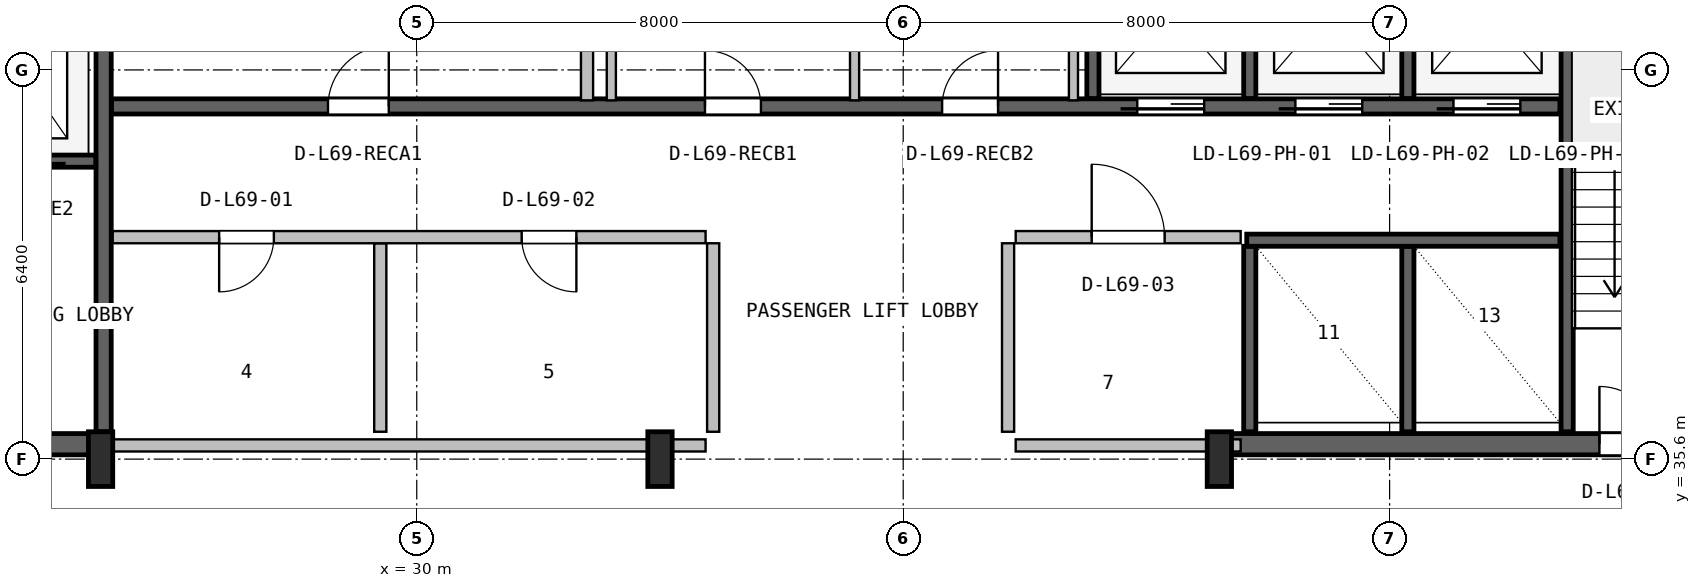
"""IFC4 building model, lengths in metres.
Left out: names, types, materials, properties, quantities, classifications, styles, units other than length and angle.
Written with IfcOpenShell. Run it as: python <this file> out.ifc"""

import sys

from ifc_helpers import new_model, si_unit, direction, frame, frame_2d, origin, origin_2d, place, context, subcontext, project, spatial, rectangle, i_section, extrude, source, transform, mapped, element, fill, save


model = new_model("IFC4")
c1 = context("Model", 3, precision=1e-05, world=origin(), true_north=direction((0.0, 1.0)))
c2 = subcontext(c1, "Body", "Model", "MODEL_VIEW")
j1 = project(units=[si_unit("LENGTHUNIT", "METRE"), si_unit("PLANEANGLEUNIT", "RADIAN")], contexts=[c1])
p1 = place(None, origin())
s1 = spatial("IfcSite", under=j1, at=p1, CompositionType="ELEMENT")
p2 = place(p1, origin())
s2 = spatial("IfcBuilding", under=s1, at=p2, CompositionType="ELEMENT")
p3 = place(p2, frame((0.0, 0.0, 277.4)))
s3 = spatial("IfcBuildingStorey", under=s2, at=p3, CompositionType="ELEMENT", Elevation=277.4)
p4 = place(p3, frame((15.67, 35.845, 0.0), z_axis=(0.0, 0.0, 1.0), x_axis=(1.0, 0.0, 0.0)))
e1 = element("IfcWall", 1, at=p4, inside=s3, PredefinedType="SHEAR", context=c2, shape_type="SweptSolid", body=[
    extrude(rectangle(XDim=9.13, YDim=0.35, at=frame_2d((4.565, 0.0))), origin(), (0.0, 0.0, 1.0), 3.55),
])
p5 = place(p4, frame((5.4, 0.0, 0.0)))
e2 = element("IfcOpeningElement", 2, at=p5, cuts=e1, PredefinedType="OPENING", context=c2, shape_type="SweptSolid", body=[
    extrude(rectangle(XDim=1.0, YDim=2.1, at=frame_2d((0.5, 1.05))), frame((0.0, 0.185, 0.0), z_axis=(0.0, -1.0, 0.0), x_axis=(1.0, 0.0, 0.0)), (0.0, 0.0, 1.0), 0.37),
])
p6 = place(p3, frame((43.2, 35.845, 0.0), z_axis=(0.0, 0.0, 1.0), x_axis=(1.0, 0.0, 0.0)))
e3 = element("IfcWall", 3, at=p6, inside=s3, PredefinedType="SHEAR", context=c2, shape_type="SweptSolid", body=[
    extrude(rectangle(XDim=9.13, YDim=0.35, at=frame_2d((4.565, 0.0))), origin(), (0.0, 0.0, 1.0), 3.55),
])
p7 = place(p6, frame((6.25, 0.0, 0.0)))
e4 = element("IfcOpeningElement", 4, at=p7, cuts=e3, PredefinedType="OPENING", context=c2, shape_type="SweptSolid", body=[
    extrude(rectangle(XDim=0.95, YDim=2.1, at=frame_2d((0.475, 1.05))), frame((0.0, 0.185, 0.0), z_axis=(0.0, -1.0, 0.0), x_axis=(1.0, 0.0, 0.0)), (0.0, 0.0, 1.0), 0.37),
])
m1 = source(origin(), c2, "Body", "SweptSolid", [
    extrude(i_section(OverallWidth=0.4, OverallDepth=0.9, WebThickness=0.016, FlangeThickness=0.028, FilletRadius=0.016, at=origin_2d()), origin(), (0.0, 0.0, 1.0), 3.8),
])
for number, where, z_axis, x_axis in (
    (5, (24.8, 35.6, 0.0), (0.0, 0.0, 1.0), (1.0, 0.0, 0.0)),
    (6, (34.0, 35.6, 0.0), (0.0, 0.0, 1.0), (1.0, 0.0, 0.0)),
    (7, (43.2, 35.6, 0.0), (0.0, 0.0, 1.0), (1.0, 0.0, 0.0)),
):
    element("IfcColumn", number, at=place(p3, frame(where, z_axis=z_axis, x_axis=x_axis)), inside=s3, PredefinedType="COLUMN", context=c2, shape_type="MappedRepresentation", body=[
        mapped(m1, transform((0.0, 0.0, 0.0), x_axis=(1.0, 0.0, 0.0), y_axis=(0.0, 1.0, 0.0), z_axis=(0.0, 0.0, 1.0), scale=1.0)),
    ])
p8 = place(p3, frame((24.85, 36.05, 0.0), z_axis=(0.0, 0.0, 1.0), x_axis=(0.0, 1.0, 0.0)))
e8 = element("IfcWall", 8, at=p8, inside=s3, PredefinedType="SHEAR", context=c2, shape_type="SweptSolid", body=[
    extrude(rectangle(XDim=10.45, YDim=0.25, at=frame_2d((5.225, 0.0))), origin(), (0.0, 0.0, 1.0), 3.55),
])
p9 = place(p3, frame((19.2, 40.5, 0.0), z_axis=(0.0, 0.0, 1.0), x_axis=(1.0, 0.0, 0.0)))
e9 = element("IfcWall", 9, at=p9, inside=s3, PredefinedType="SHEAR", context=c2, shape_type="SweptSolid", body=[
    extrude(rectangle(XDim=5.52, YDim=0.2, at=frame_2d((2.76, 0.0))), origin(), (0.0, 0.0, 1.0), 3.55),
])
p10 = place(p9, frame((1.05, 0.0, 0.0)))
e10 = element("IfcOpeningElement", 10, at=p10, cuts=e9, PredefinedType="OPENING", context=c2, shape_type="SweptSolid", body=[
    extrude(rectangle(XDim=1.1, YDim=2.18, at=frame_2d((0.55, 1.09))), frame((0.0, 0.11, 0.0), z_axis=(0.0, -1.0, 0.0), x_axis=(1.0, 0.0, 0.0)), (0.0, 0.0, 1.0), 0.22),
])
p11 = place(p9, frame((3.65, 0.0, 0.0)))
e11 = element("IfcOpeningElement", 11, at=p11, cuts=e9, PredefinedType="OPENING", context=c2, shape_type="SweptSolid", body=[
    extrude(rectangle(XDim=1.1, YDim=2.18, at=frame_2d((0.55, 1.09))), frame((0.0, 0.11, 0.0), z_axis=(0.0, -1.0, 0.0), x_axis=(1.0, 0.0, 0.0)), (0.0, 0.0, 1.0), 0.22),
])
p12 = place(p3, frame((48.92, 36.05, 0.0), z_axis=(0.0, 0.0, 1.0), x_axis=(0.0, 1.0, 0.0)))
e12 = element("IfcWall", 12, at=p12, inside=s3, PredefinedType="SHEAR", context=c2, shape_type="SweptSolid", body=[
    extrude(rectangle(XDim=10.5, YDim=0.2, at=frame_2d((5.25, 0.0))), origin(), (0.0, 0.0, 1.0), 3.55),
])
p13 = place(p3, frame((24.98, 41.4, 0.0), z_axis=(0.0, 0.0, 1.0), x_axis=(1.0, 0.0, 0.0)))
e13 = element("IfcWall", 13, at=p13, inside=s3, PredefinedType="SHEAR", context=c2, shape_type="SweptSolid", body=[
    extrude(rectangle(XDim=23.82, YDim=0.25, at=frame_2d((11.91, 0.0))), origin(), (0.0, 0.0, 1.0), 3.55),
])
p14 = place(p13, frame((16.87, 0.0, 0.0)))
e14 = element("IfcOpeningElement", 14, at=p14, cuts=e13, PredefinedType="OPENING", context=c2, shape_type="SweptSolid", body=[
    extrude(rectangle(XDim=1.1, YDim=2.18, at=frame_2d((0.55, 1.09))), frame((0.0, 0.135, 0.0), z_axis=(0.0, -1.0, 0.0), x_axis=(1.0, 0.0, 0.0)), (0.0, 0.0, 1.0), 0.27),
])
p15 = place(p13, frame((19.47, 0.0, 0.0)))
e15 = element("IfcOpeningElement", 15, at=p15, cuts=e13, PredefinedType="OPENING", context=c2, shape_type="SweptSolid", body=[
    extrude(rectangle(XDim=1.1, YDim=2.18, at=frame_2d((0.55, 1.09))), frame((0.0, 0.135, 0.0), z_axis=(0.0, -1.0, 0.0), x_axis=(1.0, 0.0, 0.0)), (0.0, 0.0, 1.0), 0.27),
])
p16 = place(p13, frame((22.07, 0.0, 0.0)))
e16 = element("IfcOpeningElement", 16, at=p16, cuts=e13, PredefinedType="OPENING", context=c2, shape_type="SweptSolid", body=[
    extrude(rectangle(XDim=1.1, YDim=2.18, at=frame_2d((0.55, 1.09))), frame((0.0, 0.135, 0.0), z_axis=(0.0, -1.0, 0.0), x_axis=(1.0, 0.0, 0.0)), (0.0, 0.0, 1.0), 0.27),
])
p17 = place(p13, frame((3.56, 0.0, 0.0)))
e17 = element("IfcOpeningElement", 17, at=p17, cuts=e13, PredefinedType="OPENING", context=c2, shape_type="SweptSolid", body=[
    extrude(rectangle(XDim=1.0, YDim=2.08, at=frame_2d((0.5, 1.04))), frame((0.0, 0.135, 0.0), z_axis=(0.0, -1.0, 0.0), x_axis=(1.0, 0.0, 0.0)), (0.0, 0.0, 1.0), 0.27),
])
p18 = place(p13, frame((9.76, 0.0, 0.0)))
e18 = element("IfcOpeningElement", 18, at=p18, cuts=e13, PredefinedType="OPENING", context=c2, shape_type="SweptSolid", body=[
    extrude(rectangle(XDim=0.92, YDim=2.08, at=frame_2d((0.46, 1.04))), frame((0.0, 0.135, 0.0), z_axis=(0.0, -1.0, 0.0), x_axis=(1.0, 0.0, 0.0)), (0.0, 0.0, 1.0), 0.27),
])
p19 = place(p13, frame((13.66, 0.0, 0.0)))
e19 = element("IfcOpeningElement", 19, at=p19, cuts=e13, PredefinedType="OPENING", context=c2, shape_type="SweptSolid", body=[
    extrude(rectangle(XDim=0.92, YDim=2.08, at=frame_2d((0.46, 1.04))), frame((0.0, 0.135, 0.0), z_axis=(0.0, -1.0, 0.0), x_axis=(1.0, 0.0, 0.0)), (0.0, 0.0, 1.0), 0.27),
])
p20 = place(p3, frame((41.12, 41.53, 0.0), z_axis=(0.0, 0.0, 1.0), x_axis=(0.0, 1.0, 0.0)))
e20 = element("IfcWall", 20, at=p20, inside=s3, PredefinedType="SHEAR", context=c2, shape_type="SweptSolid", body=[
    extrude(rectangle(XDim=5.02, YDim=0.2, at=frame_2d((2.51, 0.0))), origin(), (0.0, 0.0, 1.0), 3.55),
])
for number, where, z_axis, x_axis in (
    (21, (43.7, 41.53, 0.0), (0.0, 0.0, 1.0), (0.0, 1.0, 0.0)),
    (22, (46.3, 41.53, 0.0), (0.0, 0.0, 1.0), (0.0, 1.0, 0.0)),
):
    element("IfcWall", number, at=place(p3, frame(where, z_axis=z_axis, x_axis=x_axis)), inside=s3, PredefinedType="SHEAR", context=c2, shape_type="SweptSolid", body=[
        extrude(rectangle(XDim=2.87, YDim=0.2, at=frame_2d((1.435, 0.0))), origin(), (0.0, 0.0, 1.0), 3.55),
    ])
for number, where, z_axis, x_axis in (
    (23, (43.7, 36.05, 0.0), (0.0, 0.0, 1.0), (0.0, 1.0, 0.0)),
    (24, (46.3, 36.05, 0.0), (0.0, 0.0, 1.0), (0.0, 1.0, 0.0)),
):
    element("IfcWall", number, at=place(p3, frame(where, z_axis=z_axis, x_axis=x_axis)), inside=s3, PredefinedType="SHEAR", context=c2, shape_type="SweptSolid", body=[
        extrude(rectangle(XDim=3.05, YDim=0.2, at=frame_2d((1.525, 0.0))), origin(), (0.0, 0.0, 1.0), 3.55),
    ])
p21 = place(p3, frame((43.65, 39.2, 0.0), z_axis=(0.0, 0.0, 1.0), x_axis=(1.0, 0.0, 0.0)))
e25 = element("IfcWall", 25, at=p21, inside=s3, PredefinedType="SHEAR", context=c2, shape_type="SweptSolid", body=[
    extrude(rectangle(XDim=5.15, YDim=0.2, at=frame_2d((2.575, 0.0))), origin(), (0.0, 0.0, 1.0), 3.55),
])
p22 = place(p3, frame((25.0, 35.825, 0.0), z_axis=(0.0, 0.0, 1.0), x_axis=(1.0, 0.0, 0.0)))
e26 = element("IfcWall", 26, at=p22, inside=s3, PredefinedType="PLUMBINGWALL", context=c2, shape_type="SweptSolid", body=[
    extrude(rectangle(XDim=9.75, YDim=0.2, at=frame_2d((4.875, 0.0))), origin(), (0.0, 0.0, 1.0), 2.575),
])
p23 = place(p3, frame((29.4, 36.05, 0.0), z_axis=(0.0, 0.0, 1.0), x_axis=(0.0, 1.0, 0.0)))
e27 = element("IfcWall", 27, at=p23, inside=s3, PredefinedType="PLUMBINGWALL", context=c2, shape_type="SweptSolid", body=[
    extrude(rectangle(XDim=3.1, YDim=0.2, at=frame_2d((1.55, 0.0))), origin(), (0.0, 0.0, 1.0), 3.53),
])
p24 = place(p3, frame((25.0, 39.25, 0.0), z_axis=(0.0, 0.0, 1.0), x_axis=(1.0, 0.0, 0.0)))
e28 = element("IfcWall", 28, at=p24, inside=s3, PredefinedType="PLUMBINGWALL", context=c2, shape_type="SweptSolid", body=[
    extrude(rectangle(XDim=9.75, YDim=0.2, at=frame_2d((4.875, 0.0))), origin(), (0.0, 0.0, 1.0), 3.53),
])
p25 = place(p24, frame((1.75, 0.0, 0.0)))
e29 = element("IfcOpeningElement", 29, at=p25, cuts=e28, PredefinedType="OPENING", context=c2, shape_type="SweptSolid", body=[
    extrude(rectangle(XDim=0.9, YDim=2.06, at=frame_2d((0.45, 1.03))), frame((0.0, 0.11, 0.0), z_axis=(0.0, -1.0, 0.0), x_axis=(1.0, 0.0, 0.0)), (0.0, 0.0, 1.0), 0.22),
])
p26 = place(p24, frame((6.725, 0.0, 0.0)))
e30 = element("IfcOpeningElement", 30, at=p26, cuts=e28, PredefinedType="OPENING", context=c2, shape_type="SweptSolid", body=[
    extrude(rectangle(XDim=0.9, YDim=2.06, at=frame_2d((0.45, 1.03))), frame((0.0, 0.11, 0.0), z_axis=(0.0, -1.0, 0.0), x_axis=(1.0, 0.0, 0.0)), (0.0, 0.0, 1.0), 0.22),
])
p27 = place(p3, frame((34.875, 36.05, 0.0), z_axis=(0.0, 0.0, 1.0), x_axis=(0.0, 1.0, 0.0)))
e31 = element("IfcWall", 31, at=p27, inside=s3, PredefinedType="PLUMBINGWALL", context=c2, shape_type="SweptSolid", body=[
    extrude(rectangle(XDim=3.1, YDim=0.2, at=frame_2d((1.55, 0.0))), origin(), (0.0, 0.0, 1.0), 3.53),
])
p28 = place(p3, frame((39.85, 35.825, 0.0), z_axis=(0.0, 0.0, 1.0), x_axis=(1.0, 0.0, 0.0)))
e32 = element("IfcWall", 32, at=p28, inside=s3, PredefinedType="SOLIDWALL", context=c2, shape_type="SweptSolid", body=[
    extrude(rectangle(XDim=3.7, YDim=0.2, at=frame_2d((1.85, 0.0))), origin(), (0.0, 0.0, 1.0), 2.575),
])
p29 = place(p3, frame((39.85, 39.25, 0.0), z_axis=(0.0, 0.0, 1.0), x_axis=(1.0, 0.0, 0.0)))
e33 = element("IfcWall", 33, at=p29, inside=s3, PredefinedType="SOLIDWALL", context=c2, shape_type="SweptSolid", body=[
    extrude(rectangle(XDim=3.7, YDim=0.2, at=frame_2d((1.85, 0.0))), origin(), (0.0, 0.0, 1.0), 3.53),
])
p30 = place(p29, frame((1.25, 0.0, 0.0)))
e34 = element("IfcOpeningElement", 34, at=p30, cuts=e33, PredefinedType="OPENING", context=c2, shape_type="SweptSolid", body=[
    extrude(rectangle(XDim=1.2, YDim=2.1, at=frame_2d((0.6, 1.05))), frame((0.0, 0.11, 0.0), z_axis=(0.0, -1.0, 0.0), x_axis=(1.0, 0.0, 0.0)), (0.0, 0.0, 1.0), 0.22),
])
p31 = place(p3, frame((39.725, 36.05, 0.0), z_axis=(0.0, 0.0, 1.0), x_axis=(0.0, 1.0, 0.0)))
e35 = element("IfcWall", 35, at=p31, inside=s3, PredefinedType="SOLIDWALL", context=c2, shape_type="SweptSolid", body=[
    extrude(rectangle(XDim=3.1, YDim=0.2, at=frame_2d((1.55, 0.0))), origin(), (0.0, 0.0, 1.0), 3.53),
])
p32 = place(p3, frame((32.8, 41.5, 0.0), z_axis=(0.0, 0.0, 1.0), x_axis=(0.0, 1.0, 0.0)))
e36 = element("IfcWall", 36, at=p32, inside=s3, PredefinedType="SOLIDWALL", context=c2, shape_type="SweptSolid", body=[
    extrude(rectangle(XDim=5.02, YDim=0.2, at=frame_2d((2.51, 0.0))), origin(), (0.0, 0.0, 1.0), 3.53),
])
p33 = place(p3, frame((37.2, 41.5, 0.0), z_axis=(0.0, 0.0, 1.0), x_axis=(0.0, 1.0, 0.0)))
e37 = element("IfcWall", 37, at=p33, inside=s3, PredefinedType="PARTITIONING", context=c2, shape_type="SweptSolid", body=[
    extrude(rectangle(XDim=2.325, YDim=0.15, at=frame_2d((1.163, 0.0))), origin(), (0.0, 0.0, 1.0), 3.53),
])
for number, where, z_axis, x_axis in (
    (38, (40.8, 41.5, 0.0), (0.0, 0.0, 1.0), (0.0, 1.0, 0.0)),
    (39, (33.2, 41.5, 0.0), (0.0, 0.0, 1.0), (0.0, 1.0, 0.0)),
):
    element("IfcWall", number, at=place(p3, frame(where, z_axis=z_axis, x_axis=x_axis)), inside=s3, PredefinedType="PARTITIONING", context=c2, shape_type="SweptSolid", body=[
        extrude(rectangle(XDim=5.02, YDim=0.15, at=frame_2d((2.51, 0.0))), origin(), (0.0, 0.0, 1.0), 3.53),
    ])
m2 = source(origin(), c2, "Body", "SweptSolid", [
    extrude(rectangle(XDim=0.95, YDim=2.1, at=frame_2d((0.475, 1.05))), frame((0.0, 0.025, 0.0), z_axis=(0.0, -1.0, 0.0), x_axis=(1.0, 0.0, 0.0)), (0.0, 0.0, 1.0), 0.05),
])
p34 = place(p7, origin())
e40 = element("IfcDoor", 40, at=p34, inside=s3, OperationType="SINGLE_SWING_LEFT", PredefinedType="DOOR", context=c2, shape_type="MappedRepresentation", body=[
    mapped(m2, transform((0.0, 0.0, 0.0), x_axis=(1.0, 0.0, 0.0), y_axis=(0.0, 1.0, 0.0), z_axis=(0.0, 0.0, 1.0), scale=1.0)),
])
fill(e4, e40)
m3 = source(origin(), c2, "Body", "SweptSolid", [
    extrude(rectangle(XDim=1.1, YDim=2.18, at=frame_2d((0.55, 1.09))), frame((0.0, 0.025, 0.0), z_axis=(0.0, -1.0, 0.0), x_axis=(1.0, 0.0, 0.0)), (0.0, 0.0, 1.0), 0.05),
])
p35 = place(p14, frame((1.1, 0.0, 0.0), z_axis=(0.0, 0.0, 1.0), x_axis=(-1.0, 0.0, 0.0)))
e41 = element("IfcDoor", 41, at=p35, inside=s3, OperationType="SLIDING_TO_LEFT", PredefinedType="DOOR", context=c2, shape_type="MappedRepresentation", body=[
    mapped(m3, transform((0.0, 0.0, 0.0), x_axis=(1.0, 0.0, 0.0), y_axis=(0.0, 1.0, 0.0), z_axis=(0.0, 0.0, 1.0), scale=1.0)),
])
fill(e14, e41)
p36 = place(p15, frame((1.1, 0.0, 0.0), z_axis=(0.0, 0.0, 1.0), x_axis=(-1.0, 0.0, 0.0)))
e42 = element("IfcDoor", 42, at=p36, inside=s3, OperationType="SLIDING_TO_LEFT", PredefinedType="DOOR", context=c2, shape_type="MappedRepresentation", body=[
    mapped(m3, transform((0.0, 0.0, 0.0), x_axis=(1.0, 0.0, 0.0), y_axis=(0.0, 1.0, 0.0), z_axis=(0.0, 0.0, 1.0), scale=1.0)),
])
fill(e15, e42)
p37 = place(p16, frame((1.1, 0.0, 0.0), z_axis=(0.0, 0.0, 1.0), x_axis=(-1.0, 0.0, 0.0)))
e43 = element("IfcDoor", 43, at=p37, inside=s3, OperationType="SLIDING_TO_LEFT", PredefinedType="DOOR", context=c2, shape_type="MappedRepresentation", body=[
    mapped(m3, transform((0.0, 0.0, 0.0), x_axis=(1.0, 0.0, 0.0), y_axis=(0.0, 1.0, 0.0), z_axis=(0.0, 0.0, 1.0), scale=1.0)),
])
fill(e16, e43)
m4 = source(origin(), c2, "Body", "SweptSolid", [
    extrude(rectangle(XDim=1.0, YDim=2.08, at=frame_2d((0.5, 1.04))), frame((0.0, 0.025, 0.0), z_axis=(0.0, -1.0, 0.0), x_axis=(1.0, 0.0, 0.0)), (0.0, 0.0, 1.0), 0.05),
])
p38 = place(p17, origin())
e44 = element("IfcDoor", 44, at=p38, inside=s3, OperationType="SINGLE_SWING_RIGHT", PredefinedType="DOOR", context=c2, shape_type="MappedRepresentation", body=[
    mapped(m4, transform((0.0, 0.0, 0.0), x_axis=(1.0, 0.0, 0.0), y_axis=(0.0, 1.0, 0.0), z_axis=(0.0, 0.0, 1.0), scale=1.0)),
])
fill(e17, e44)
m5 = source(origin(), c2, "Body", "SweptSolid", [
    extrude(rectangle(XDim=0.92, YDim=2.08, at=frame_2d((0.46, 1.04))), frame((0.0, 0.025, 0.0), z_axis=(0.0, -1.0, 0.0), x_axis=(1.0, 0.0, 0.0)), (0.0, 0.0, 1.0), 0.05),
])
p39 = place(p18, origin())
e45 = element("IfcDoor", 45, at=p39, inside=s3, OperationType="SINGLE_SWING_LEFT", PredefinedType="DOOR", context=c2, shape_type="MappedRepresentation", body=[
    mapped(m5, transform((0.0, 0.0, 0.0), x_axis=(1.0, 0.0, 0.0), y_axis=(0.0, 1.0, 0.0), z_axis=(0.0, 0.0, 1.0), scale=1.0)),
])
fill(e18, e45)
p40 = place(p19, origin())
e46 = element("IfcDoor", 46, at=p40, inside=s3, OperationType="SINGLE_SWING_RIGHT", PredefinedType="DOOR", context=c2, shape_type="MappedRepresentation", body=[
    mapped(m5, transform((0.0, 0.0, 0.0), x_axis=(1.0, 0.0, 0.0), y_axis=(0.0, 1.0, 0.0), z_axis=(0.0, 0.0, 1.0), scale=1.0)),
])
fill(e19, e46)
m6 = source(origin(), c2, "Body", "SweptSolid", [
    extrude(rectangle(XDim=0.9, YDim=2.06, at=frame_2d((0.45, 1.03))), frame((0.0, 0.025, 0.0), z_axis=(0.0, -1.0, 0.0), x_axis=(1.0, 0.0, 0.0)), (0.0, 0.0, 1.0), 0.05),
])
p41 = place(p25, frame((0.9, 0.0, 0.0), z_axis=(0.0, 0.0, 1.0), x_axis=(-1.0, 0.0, 0.0)))
e47 = element("IfcDoor", 47, at=p41, inside=s3, OperationType="SINGLE_SWING_LEFT", PredefinedType="DOOR", context=c2, shape_type="MappedRepresentation", body=[
    mapped(m6, transform((0.0, 0.0, 0.0), x_axis=(1.0, 0.0, 0.0), y_axis=(0.0, 1.0, 0.0), z_axis=(0.0, 0.0, 1.0), scale=1.0)),
])
fill(e29, e47)
p42 = place(p26, frame((0.9, 0.0, 0.0), z_axis=(0.0, 0.0, 1.0), x_axis=(-1.0, 0.0, 0.0)))
e48 = element("IfcDoor", 48, at=p42, inside=s3, OperationType="SINGLE_SWING_RIGHT", PredefinedType="DOOR", context=c2, shape_type="MappedRepresentation", body=[
    mapped(m6, transform((0.0, 0.0, 0.0), x_axis=(1.0, 0.0, 0.0), y_axis=(0.0, 1.0, 0.0), z_axis=(0.0, 0.0, 1.0), scale=1.0)),
])
fill(e30, e48)
m7 = source(origin(), c2, "Body", "SweptSolid", [
    extrude(rectangle(XDim=1.2, YDim=2.1, at=frame_2d((0.6, 1.05))), frame((0.0, 0.025, 0.0), z_axis=(0.0, -1.0, 0.0), x_axis=(1.0, 0.0, 0.0)), (0.0, 0.0, 1.0), 0.05),
])
p43 = place(p30, origin())
e49 = element("IfcDoor", 49, at=p43, inside=s3, OperationType="SINGLE_SWING_LEFT", PredefinedType="DOOR", context=c2, shape_type="MappedRepresentation", body=[
    mapped(m7, transform((0.0, 0.0, 0.0), x_axis=(1.0, 0.0, 0.0), y_axis=(0.0, 1.0, 0.0), z_axis=(0.0, 0.0, 1.0), scale=1.0)),
])
fill(e34, e49)
save(model, sys.argv[1])
